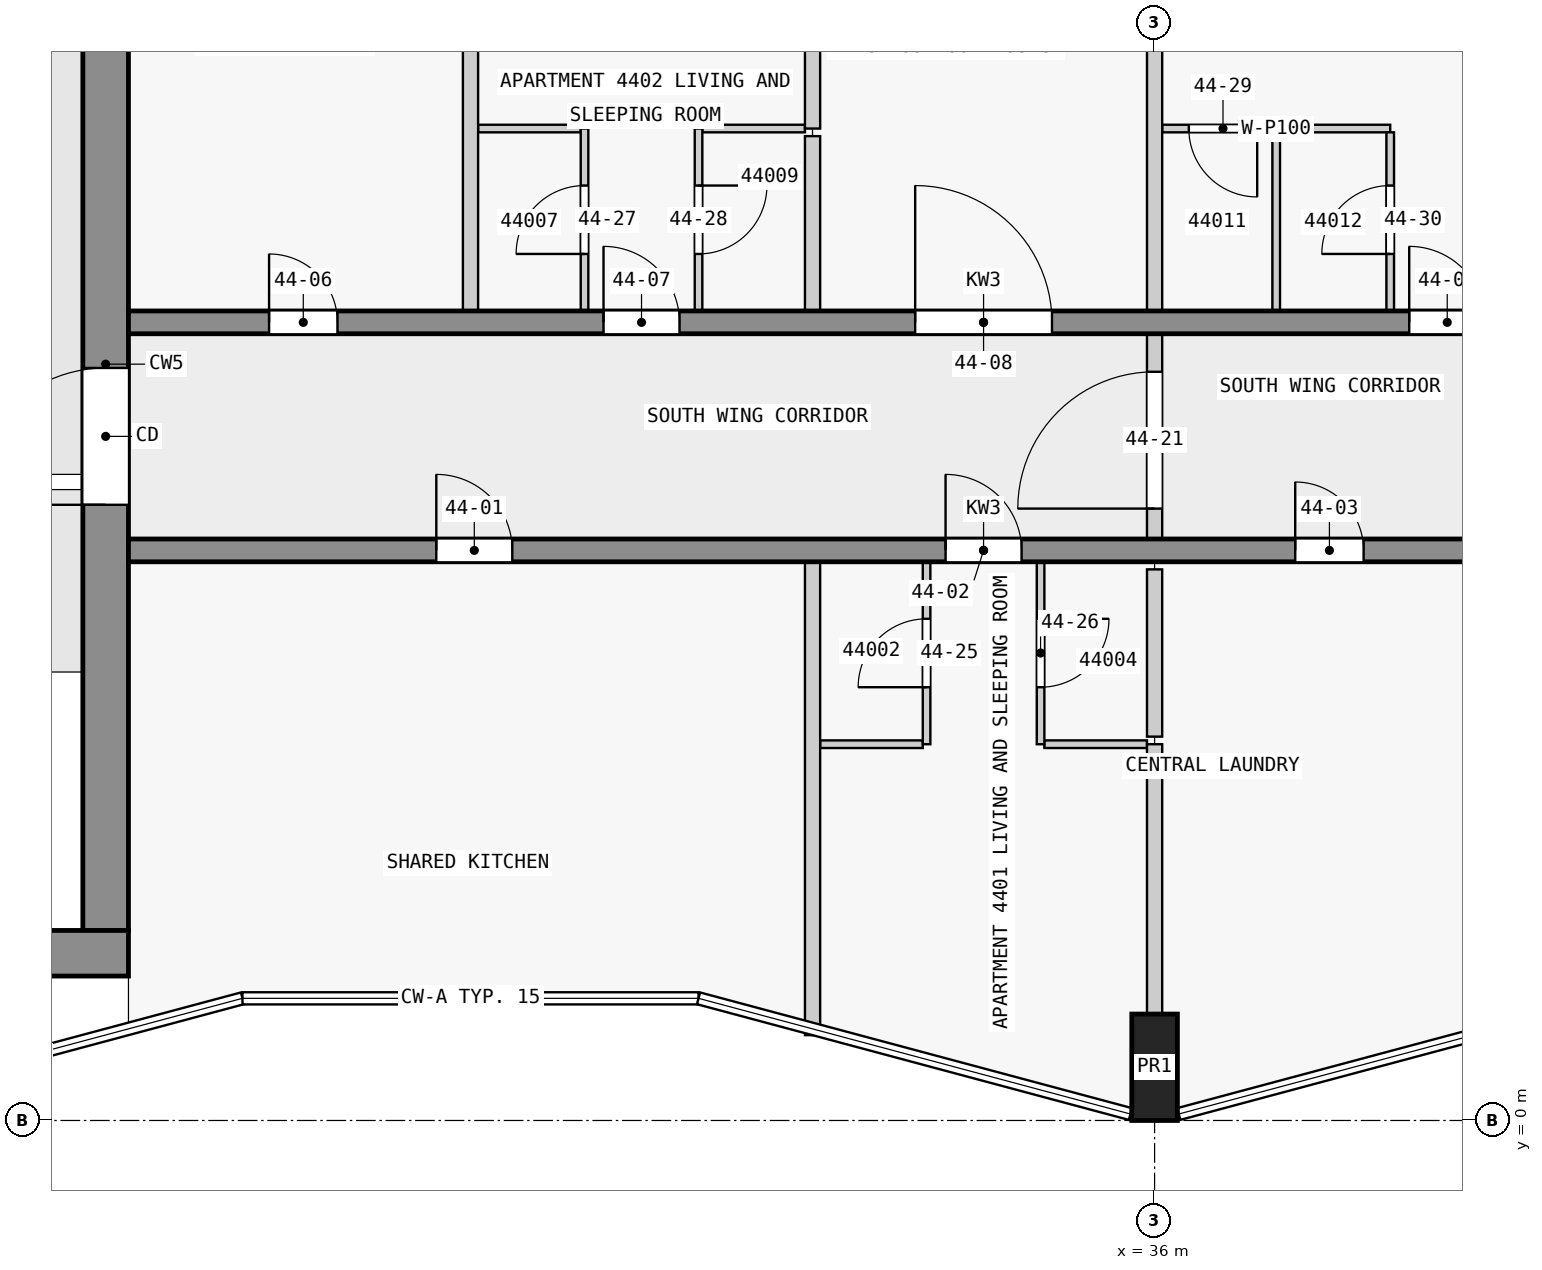
"""IFC4 building model, lengths in metres.
Left out: names, types, materials, properties, quantities, classifications, styles, units other than length and angle.
Written with IfcOpenShell. Run it as: python <this file> out.ifc"""

import sys

from ifc_helpers import new_model, si_unit, direction, frame, frame_2d, origin, origin_2d, place, context, subcontext, project, spatial, rectangle, extrude, element, fill, save


model = new_model("IFC4")
c1 = context("Model", 3, precision=1e-05, world=origin(), true_north=direction((0.0, 1.0)))
c2 = subcontext(c1, "Body", "Model", "MODEL_VIEW")
j1 = project(units=[si_unit("LENGTHUNIT", "METRE"), si_unit("PLANEANGLEUNIT", "RADIAN")], contexts=[c1])
p1 = place(None, origin())
s1 = spatial("IfcSite", under=j1, at=p1, CompositionType="ELEMENT")
p2 = place(p1, origin())
s2 = spatial("IfcBuilding", under=s1, at=p2, CompositionType="ELEMENT")
p3 = place(p2, frame((0.0, 0.0, 170.9)))
s3 = spatial("IfcBuildingStorey", under=s2, at=p3, CompositionType="ELEMENT", Elevation=170.9)
p4 = place(p3, frame((36.0, 0.7, 0.0), z_axis=(0.0, 0.0, 1.0), x_axis=(1.0, 0.0, 0.0)))
e1 = element("IfcColumn", 1, at=p4, inside=s3, PredefinedType="COLUMN", context=c2, shape_type="SweptSolid", body=[
    extrude(rectangle(XDim=0.6, YDim=1.4, at=origin_2d()), origin(), (0.0, 0.0, 1.0), 3.5),
])
p5 = place(p3, frame((1.7, 2.2, 0.0), z_axis=(0.0, 0.0, 1.0), x_axis=(1.0, 0.0, 0.0)))
e2 = element("IfcWall", 2, at=p5, inside=s3, PredefinedType="SHEAR", context=c2, shape_type="SweptSolid", body=[
    extrude(rectangle(XDim=20.8, YDim=0.6, at=frame_2d((10.4, 0.0))), origin(), (0.0, 0.0, 1.0), 3.25),
])
p6 = place(p3, frame((22.2, 2.5, 0.0), z_axis=(0.0, 0.0, 1.0), x_axis=(0.0, 1.0, 0.0)))
e3 = element("IfcWall", 3, at=p6, inside=s3, PredefinedType="SHEAR", context=c2, shape_type="SweptSolid", body=[
    extrude(rectangle(XDim=14.9, YDim=0.6, at=frame_2d((7.45, 0.0))), origin(), (0.0, 0.0, 1.0), 3.25),
])
p7 = place(p6, frame((5.6, 0.0, 0.0)))
e4 = element("IfcOpeningElement", 4, at=p7, cuts=e3, PredefinedType="OPENING", context=c2, shape_type="SweptSolid", body=[
    extrude(rectangle(XDim=1.8, YDim=2.1, at=frame_2d((0.9, 1.05))), frame((0.0, 0.31, 0.0), z_axis=(0.0, -1.0, 0.0), x_axis=(1.0, 0.0, 0.0)), (0.0, 0.0, 1.0), 0.62),
])
p8 = place(p3, frame((22.5, 7.5, 0.0), z_axis=(0.0, 0.0, 1.0), x_axis=(1.0, 0.0, 0.0)))
e5 = element("IfcWall", 5, at=p8, inside=s3, PredefinedType="SHEAR", context=c2, shape_type="SweptSolid", body=[
    extrude(rectangle(XDim=22.5, YDim=0.3, at=frame_2d((11.25, 0.0))), origin(), (0.0, 0.0, 1.0), 3.25),
])
p9 = place(p8, frame((4.05, 0.0, 0.0)))
e6 = element("IfcOpeningElement", 6, at=p9, cuts=e5, PredefinedType="OPENING", context=c2, shape_type="SweptSolid", body=[
    extrude(rectangle(XDim=1.0, YDim=2.1, at=frame_2d((0.5, 1.05))), frame((0.0, 0.16, 0.0), z_axis=(0.0, -1.0, 0.0), x_axis=(1.0, 0.0, 0.0)), (0.0, 0.0, 1.0), 0.32),
])
p10 = place(p8, frame((10.75, 0.0, 0.0)))
e7 = element("IfcOpeningElement", 7, at=p10, cuts=e5, PredefinedType="OPENING", context=c2, shape_type="SweptSolid", body=[
    extrude(rectangle(XDim=1.0, YDim=2.1, at=frame_2d((0.5, 1.05))), frame((0.0, 0.16, 0.0), z_axis=(0.0, -1.0, 0.0), x_axis=(1.0, 0.0, 0.0)), (0.0, 0.0, 1.0), 0.32),
])
p11 = place(p8, frame((15.35, 0.0, 0.0)))
e8 = element("IfcOpeningElement", 8, at=p11, cuts=e5, PredefinedType="OPENING", context=c2, shape_type="SweptSolid", body=[
    extrude(rectangle(XDim=0.9, YDim=2.1, at=frame_2d((0.45, 1.05))), frame((0.0, 0.16, 0.0), z_axis=(0.0, -1.0, 0.0), x_axis=(1.0, 0.0, 0.0)), (0.0, 0.0, 1.0), 0.32),
])
p12 = place(p8, frame((18.75, 0.0, 0.0)))
e9 = element("IfcOpeningElement", 9, at=p12, cuts=e5, PredefinedType="OPENING", context=c2, shape_type="SweptSolid", body=[
    extrude(rectangle(XDim=0.9, YDim=2.1, at=frame_2d((0.45, 1.05))), frame((0.0, 0.16, 0.0), z_axis=(0.0, -1.0, 0.0), x_axis=(1.0, 0.0, 0.0)), (0.0, 0.0, 1.0), 0.32),
])
p13 = place(p8, frame((20.95, 0.0, 0.0)))
e10 = element("IfcOpeningElement", 10, at=p13, cuts=e5, PredefinedType="OPENING", context=c2, shape_type="SweptSolid", body=[
    extrude(rectangle(XDim=1.0, YDim=2.1, at=frame_2d((0.5, 1.05))), frame((0.0, 0.16, 0.0), z_axis=(0.0, -1.0, 0.0), x_axis=(1.0, 0.0, 0.0)), (0.0, 0.0, 1.0), 0.32),
])
p14 = place(p3, frame((22.5, 10.5, 0.0), z_axis=(0.0, 0.0, 1.0), x_axis=(1.0, 0.0, 0.0)))
e11 = element("IfcWall", 11, at=p14, inside=s3, PredefinedType="SHEAR", context=c2, shape_type="SweptSolid", body=[
    extrude(rectangle(XDim=22.5, YDim=0.3, at=frame_2d((11.25, 0.0))), origin(), (0.0, 0.0, 1.0), 3.25),
])
p15 = place(p14, frame((1.85, 0.0, 0.0)))
e12 = element("IfcOpeningElement", 12, at=p15, cuts=e11, PredefinedType="OPENING", context=c2, shape_type="SweptSolid", body=[
    extrude(rectangle(XDim=0.9, YDim=2.1, at=frame_2d((0.45, 1.05))), frame((0.0, 0.16, 0.0), z_axis=(0.0, -1.0, 0.0), x_axis=(1.0, 0.0, 0.0)), (0.0, 0.0, 1.0), 0.32),
])
p16 = place(p14, frame((6.25, 0.0, 0.0)))
e13 = element("IfcOpeningElement", 13, at=p16, cuts=e11, PredefinedType="OPENING", context=c2, shape_type="SweptSolid", body=[
    extrude(rectangle(XDim=1.0, YDim=2.1, at=frame_2d((0.5, 1.05))), frame((0.0, 0.16, 0.0), z_axis=(0.0, -1.0, 0.0), x_axis=(1.0, 0.0, 0.0)), (0.0, 0.0, 1.0), 0.32),
])
p17 = place(p14, frame((10.35, 0.0, 0.0)))
e14 = element("IfcOpeningElement", 14, at=p17, cuts=e11, PredefinedType="OPENING", context=c2, shape_type="SweptSolid", body=[
    extrude(rectangle(XDim=1.8, YDim=2.1, at=frame_2d((0.9, 1.05))), frame((0.0, 0.16, 0.0), z_axis=(0.0, -1.0, 0.0), x_axis=(1.0, 0.0, 0.0)), (0.0, 0.0, 1.0), 0.32),
])
p18 = place(p14, frame((16.85, 0.0, 0.0)))
e15 = element("IfcOpeningElement", 15, at=p18, cuts=e11, PredefinedType="OPENING", context=c2, shape_type="SweptSolid", body=[
    extrude(rectangle(XDim=1.0, YDim=2.1, at=frame_2d((0.5, 1.05))), frame((0.0, 0.16, 0.0), z_axis=(0.0, -1.0, 0.0), x_axis=(1.0, 0.0, 0.0)), (0.0, 0.0, 1.0), 0.32),
])
for number, where, z_axis, x_axis in (
    (16, (31.6, 4.95, 0.0), (0.0, 0.0, 1.0), (1.0, 0.0, 0.0)),
    (17, (34.55, 4.95, 0.0), (0.0, 0.0, 1.0), (1.0, 0.0, 0.0)),
    (18, (28.45, 13.05, 0.0), (0.0, 0.0, 1.0), (-1.0, 0.0, 0.0)),
    (19, (31.4, 13.05, 0.0), (0.0, 0.0, 1.0), (-1.0, 0.0, 0.0)),
):
    element("IfcWall", number, at=place(p3, frame(where, z_axis=z_axis, x_axis=x_axis)), inside=s3, PredefinedType="PARTITIONING", context=c2, shape_type="SweptSolid", body=[
        extrude(rectangle(XDim=1.35, YDim=0.1, at=frame_2d((0.675, 0.0))), origin(), (0.0, 0.0, 1.0), 3.25),
    ])
p19 = place(p3, frame((39.1, 13.05, 0.0), z_axis=(0.0, 0.0, 1.0), x_axis=(-1.0, 0.0, 0.0)))
e20 = element("IfcWall", 20, at=p19, inside=s3, PredefinedType="PARTITIONING", context=c2, shape_type="SweptSolid", body=[
    extrude(rectangle(XDim=3.0, YDim=0.1, at=frame_2d((1.5, 0.0))), origin(), (0.0, 0.0, 1.0), 3.25),
])
p20 = place(p19, frame((1.75, 0.0, 0.0)))
e21 = element("IfcOpeningElement", 21, at=p20, cuts=e20, PredefinedType="OPENING", context=c2, shape_type="SweptSolid", body=[
    extrude(rectangle(XDim=0.9, YDim=2.1, at=frame_2d((0.45, 1.05))), frame((0.0, 0.06, 0.0), z_axis=(0.0, -1.0, 0.0), x_axis=(1.0, 0.0, 0.0)), (0.0, 0.0, 1.0), 0.12),
])
p21 = place(p3, frame((27.0, 10.65, 0.0), z_axis=(0.0, 0.0, 1.0), x_axis=(0.0, 1.0, 0.0)))
e22 = element("IfcWall", 22, at=p21, inside=s3, PredefinedType="PARTITIONING", context=c2, shape_type="SweptSolid", body=[
    extrude(rectangle(XDim=5.823, YDim=0.2, at=frame_2d((2.912, 0.0))), origin(), (0.0, 0.0, 1.0), 3.25),
])
p22 = place(p3, frame((28.5, 10.65, 0.0), z_axis=(0.0, 0.0, 1.0), x_axis=(0.0, 1.0, 0.0)))
e23 = element("IfcWall", 23, at=p22, inside=s3, PredefinedType="PARTITIONING", context=c2, shape_type="SweptSolid", body=[
    extrude(rectangle(XDim=2.4, YDim=0.1, at=frame_2d((1.2, 0.0))), origin(), (0.0, 0.0, 1.0), 3.25),
])
p23 = place(p22, frame((0.75, 0.0, 0.0)))
e24 = element("IfcOpeningElement", 24, at=p23, cuts=e23, PredefinedType="OPENING", context=c2, shape_type="SweptSolid", body=[
    extrude(rectangle(XDim=0.9, YDim=2.1, at=frame_2d((0.45, 1.05))), frame((0.0, 0.06, 0.0), z_axis=(0.0, -1.0, 0.0), x_axis=(1.0, 0.0, 0.0)), (0.0, 0.0, 1.0), 0.12),
])
p24 = place(p3, frame((30.0, 13.05, 0.0), z_axis=(0.0, 0.0, 1.0), x_axis=(0.0, -1.0, 0.0)))
e25 = element("IfcWall", 25, at=p24, inside=s3, PredefinedType="PARTITIONING", context=c2, shape_type="SweptSolid", body=[
    extrude(rectangle(XDim=2.4, YDim=0.1, at=frame_2d((1.2, 0.0))), origin(), (0.0, 0.0, 1.0), 3.25),
])
p25 = place(p24, frame((0.75, 0.0, 0.0)))
e26 = element("IfcOpeningElement", 26, at=p25, cuts=e25, PredefinedType="OPENING", context=c2, shape_type="SweptSolid", body=[
    extrude(rectangle(XDim=0.9, YDim=2.1, at=frame_2d((0.45, 1.05))), frame((0.0, 0.06, 0.0), z_axis=(0.0, -1.0, 0.0), x_axis=(1.0, 0.0, 0.0)), (0.0, 0.0, 1.0), 0.12),
])
p26 = place(p3, frame((31.5, 16.878, 0.0), z_axis=(0.0, 0.0, 1.0), x_axis=(0.0, -1.0, 0.0)))
e27 = element("IfcWall", 27, at=p26, inside=s3, PredefinedType="PARTITIONING", context=c2, shape_type="SweptSolid", body=[
    extrude(rectangle(XDim=3.828, YDim=0.2, at=frame_2d((1.914, 0.0))), origin(), (0.0, 0.0, 1.0), 3.25),
])
p27 = place(p3, frame((31.5, 1.122, 0.0), z_axis=(0.0, 0.0, 1.0), x_axis=(0.0, 1.0, 0.0)))
e28 = element("IfcWall", 28, at=p27, inside=s3, PredefinedType="PARTITIONING", context=c2, shape_type="SweptSolid", body=[
    extrude(rectangle(XDim=6.228, YDim=0.2, at=frame_2d((3.114, 0.0))), origin(), (0.0, 0.0, 1.0), 3.25),
])
p28 = place(p3, frame((31.5, 10.65, 0.0), z_axis=(0.0, 0.0, 1.0), x_axis=(0.0, 1.0, 0.0)))
e29 = element("IfcWall", 29, at=p28, inside=s3, PredefinedType="PARTITIONING", context=c2, shape_type="SweptSolid", body=[
    extrude(rectangle(XDim=2.3, YDim=0.2, at=frame_2d((1.15, 0.0))), origin(), (0.0, 0.0, 1.0), 3.25),
])
p29 = place(p3, frame((33.0, 4.95, 0.0), z_axis=(0.0, 0.0, 1.0), x_axis=(0.0, 1.0, 0.0)))
e30 = element("IfcWall", 30, at=p29, inside=s3, PredefinedType="PARTITIONING", context=c2, shape_type="SweptSolid", body=[
    extrude(rectangle(XDim=2.4, YDim=0.1, at=frame_2d((1.2, 0.0))), origin(), (0.0, 0.0, 1.0), 3.25),
])
p30 = place(p29, frame((0.75, 0.0, 0.0)))
e31 = element("IfcOpeningElement", 31, at=p30, cuts=e30, PredefinedType="OPENING", context=c2, shape_type="SweptSolid", body=[
    extrude(rectangle(XDim=0.9, YDim=2.1, at=frame_2d((0.45, 1.05))), frame((0.0, 0.06, 0.0), z_axis=(0.0, -1.0, 0.0), x_axis=(1.0, 0.0, 0.0)), (0.0, 0.0, 1.0), 0.12),
])
p31 = place(p3, frame((34.5, 7.35, 0.0), z_axis=(0.0, 0.0, 1.0), x_axis=(0.0, -1.0, 0.0)))
e32 = element("IfcWall", 32, at=p31, inside=s3, PredefinedType="PARTITIONING", context=c2, shape_type="SweptSolid", body=[
    extrude(rectangle(XDim=2.4, YDim=0.1, at=frame_2d((1.2, 0.0))), origin(), (0.0, 0.0, 1.0), 3.25),
])
p32 = place(p31, frame((0.75, 0.0, 0.0)))
e33 = element("IfcOpeningElement", 33, at=p32, cuts=e32, PredefinedType="OPENING", context=c2, shape_type="SweptSolid", body=[
    extrude(rectangle(XDim=0.9, YDim=2.1, at=frame_2d((0.45, 1.05))), frame((0.0, 0.06, 0.0), z_axis=(0.0, -1.0, 0.0), x_axis=(1.0, 0.0, 0.0)), (0.0, 0.0, 1.0), 0.12),
])
p33 = place(p3, frame((36.0, 4.95, 0.0), z_axis=(0.0, 0.0, 1.0), x_axis=(0.0, -1.0, 0.0)))
e34 = element("IfcWall", 34, at=p33, inside=s3, PredefinedType="PARTITIONING", context=c2, shape_type="SweptSolid", body=[
    extrude(rectangle(XDim=3.55, YDim=0.2, at=frame_2d((1.775, 0.0))), origin(), (0.0, 0.0, 1.0), 3.25),
])
p34 = place(p3, frame((36.0, 5.05, 0.0), z_axis=(0.0, 0.0, 1.0), x_axis=(0.0, 1.0, 0.0)))
e35 = element("IfcWall", 35, at=p34, inside=s3, PredefinedType="PARTITIONING", context=c2, shape_type="SweptSolid", body=[
    extrude(rectangle(XDim=2.2, YDim=0.2, at=frame_2d((1.1, 0.0))), origin(), (0.0, 0.0, 1.0), 3.25),
])
p35 = place(p3, frame((36.0, 10.65, 0.0), z_axis=(0.0, 0.0, 1.0), x_axis=(0.0, 1.0, 0.0)))
e36 = element("IfcWall", 36, at=p35, inside=s3, PredefinedType="PARTITIONING", context=c2, shape_type="SweptSolid", body=[
    extrude(rectangle(XDim=5.95, YDim=0.2, at=frame_2d((2.975, 0.0))), origin(), (0.0, 0.0, 1.0), 3.25),
])
p36 = place(p3, frame((37.6, 10.65, 0.0), z_axis=(0.0, 0.0, 1.0), x_axis=(0.0, 1.0, 0.0)))
e37 = element("IfcWall", 37, at=p36, inside=s3, PredefinedType="PARTITIONING", context=c2, shape_type="SweptSolid", body=[
    extrude(rectangle(XDim=2.35, YDim=0.1, at=frame_2d((1.175, 0.0))), origin(), (0.0, 0.0, 1.0), 3.25),
])
p37 = place(p3, frame((39.1, 10.65, 0.0), z_axis=(0.0, 0.0, 1.0), x_axis=(0.0, 1.0, 0.0)))
e38 = element("IfcWall", 38, at=p37, inside=s3, PredefinedType="PARTITIONING", context=c2, shape_type="SweptSolid", body=[
    extrude(rectangle(XDim=2.35, YDim=0.1, at=frame_2d((1.175, 0.0))), origin(), (0.0, 0.0, 1.0), 3.25),
])
p38 = place(p37, frame((0.75, 0.0, 0.0)))
e39 = element("IfcOpeningElement", 39, at=p38, cuts=e38, PredefinedType="OPENING", context=c2, shape_type="SweptSolid", body=[
    extrude(rectangle(XDim=0.9, YDim=2.1, at=frame_2d((0.45, 1.05))), frame((0.0, 0.06, 0.0), z_axis=(0.0, -1.0, 0.0), x_axis=(1.0, 0.0, 0.0)), (0.0, 0.0, 1.0), 0.12),
])
p39 = place(p3, frame((36.0, 7.35, 0.0), z_axis=(0.0, 0.0, 1.0), x_axis=(0.0, 1.0, 0.0)))
e40 = element("IfcWall", 40, at=p39, inside=s3, PredefinedType="PARTITIONING", context=c2, shape_type="SweptSolid", body=[
    extrude(rectangle(XDim=3.2, YDim=0.2, at=frame_2d((1.6, 0.0))), origin(), (0.0, 0.0, 1.0), 3.25),
])
p40 = place(p39, frame((0.7, 0.0, 0.0)))
e41 = element("IfcOpeningElement", 41, at=p40, cuts=e40, PredefinedType="OPENING", context=c2, shape_type="SweptSolid", body=[
    extrude(rectangle(XDim=1.8, YDim=2.1, at=frame_2d((0.9, 1.05))), frame((0.0, 0.11, 0.0), z_axis=(0.0, -1.0, 0.0), x_axis=(1.0, 0.0, 0.0)), (0.0, 0.0, 1.0), 0.22),
])
p41 = place(p7, origin())
e42 = element("IfcDoor", 42, at=p41, inside=s3, OperationType="DOUBLE_DOOR_SINGLE_SWING", PredefinedType="DOOR", context=c2, shape_type="SweptSolid", body=[
    extrude(rectangle(XDim=1.8, YDim=2.1, at=frame_2d((0.9, 1.05))), frame((0.0, 0.025, 0.0), z_axis=(0.0, -1.0, 0.0), x_axis=(1.0, 0.0, 0.0)), (0.0, 0.0, 1.0), 0.05),
])
fill(e4, e42)
p42 = place(p9, origin())
e43 = element("IfcDoor", 43, at=p42, inside=s3, OperationType="SINGLE_SWING_LEFT", PredefinedType="DOOR", context=c2, shape_type="SweptSolid", body=[
    extrude(rectangle(XDim=1.0, YDim=2.1, at=frame_2d((0.5, 1.05))), frame((0.0, 0.025, 0.0), z_axis=(0.0, -1.0, 0.0), x_axis=(1.0, 0.0, 0.0)), (0.0, 0.0, 1.0), 0.05),
])
fill(e6, e43)
p43 = place(p10, origin())
e44 = element("IfcDoor", 44, at=p43, inside=s3, OperationType="SINGLE_SWING_LEFT", PredefinedType="DOOR", context=c2, shape_type="SweptSolid", body=[
    extrude(rectangle(XDim=1.0, YDim=2.1, at=frame_2d((0.5, 1.05))), frame((0.0, 0.025, 0.0), z_axis=(0.0, -1.0, 0.0), x_axis=(1.0, 0.0, 0.0)), (0.0, 0.0, 1.0), 0.05),
])
fill(e7, e44)
p44 = place(p11, origin())
e45 = element("IfcDoor", 45, at=p44, inside=s3, OperationType="SINGLE_SWING_RIGHT", PredefinedType="DOOR", context=c2, shape_type="SweptSolid", body=[
    extrude(rectangle(XDim=0.9, YDim=2.1, at=frame_2d((0.45, 1.05))), frame((0.0, 0.025, 0.0), z_axis=(0.0, -1.0, 0.0), x_axis=(1.0, 0.0, 0.0)), (0.0, 0.0, 1.0), 0.05),
])
fill(e8, e45)
p45 = place(p15, origin())
e46 = element("IfcDoor", 46, at=p45, inside=s3, OperationType="SINGLE_SWING_LEFT", PredefinedType="DOOR", context=c2, shape_type="SweptSolid", body=[
    extrude(rectangle(XDim=0.9, YDim=2.1, at=frame_2d((0.45, 1.05))), frame((0.0, 0.025, 0.0), z_axis=(0.0, -1.0, 0.0), x_axis=(1.0, 0.0, 0.0)), (0.0, 0.0, 1.0), 0.05),
])
fill(e12, e46)
p46 = place(p16, origin())
e47 = element("IfcDoor", 47, at=p46, inside=s3, OperationType="SINGLE_SWING_LEFT", PredefinedType="DOOR", context=c2, shape_type="SweptSolid", body=[
    extrude(rectangle(XDim=1.0, YDim=2.1, at=frame_2d((0.5, 1.05))), frame((0.0, 0.025, 0.0), z_axis=(0.0, -1.0, 0.0), x_axis=(1.0, 0.0, 0.0)), (0.0, 0.0, 1.0), 0.05),
])
fill(e13, e47)
p47 = place(p17, origin())
e48 = element("IfcDoor", 48, at=p47, inside=s3, OperationType="SINGLE_SWING_LEFT", PredefinedType="DOOR", context=c2, shape_type="SweptSolid", body=[
    extrude(rectangle(XDim=1.8, YDim=2.1, at=frame_2d((0.9, 1.05))), frame((0.0, 0.025, 0.0), z_axis=(0.0, -1.0, 0.0), x_axis=(1.0, 0.0, 0.0)), (0.0, 0.0, 1.0), 0.05),
])
fill(e14, e48)
p48 = place(p18, origin())
e49 = element("IfcDoor", 49, at=p48, inside=s3, OperationType="SINGLE_SWING_RIGHT", PredefinedType="DOOR", context=c2, shape_type="SweptSolid", body=[
    extrude(rectangle(XDim=1.0, YDim=2.1, at=frame_2d((0.5, 1.05))), frame((0.0, 0.025, 0.0), z_axis=(0.0, -1.0, 0.0), x_axis=(1.0, 0.0, 0.0)), (0.0, 0.0, 1.0), 0.05),
])
fill(e15, e49)
p49 = place(p40, origin())
e50 = element("IfcDoor", 50, at=p49, inside=s3, OperationType="SINGLE_SWING_LEFT", PredefinedType="DOOR", context=c2, shape_type="SweptSolid", body=[
    extrude(rectangle(XDim=1.8, YDim=2.1, at=frame_2d((0.9, 1.05))), frame((0.0, 0.025, 0.0), z_axis=(0.0, -1.0, 0.0), x_axis=(1.0, 0.0, 0.0)), (0.0, 0.0, 1.0), 0.05),
])
fill(e41, e50)
p50 = place(p30, origin())
e51 = element("IfcDoor", 51, at=p50, inside=s3, OperationType="SINGLE_SWING_RIGHT", PredefinedType="DOOR", context=c2, shape_type="SweptSolid", body=[
    extrude(rectangle(XDim=0.9, YDim=2.1, at=frame_2d((0.45, 1.05))), frame((0.0, 0.025, 0.0), z_axis=(0.0, -1.0, 0.0), x_axis=(1.0, 0.0, 0.0)), (0.0, 0.0, 1.0), 0.05),
])
fill(e31, e51)
p51 = place(p32, origin())
e52 = element("IfcDoor", 52, at=p51, inside=s3, OperationType="SINGLE_SWING_RIGHT", PredefinedType="DOOR", context=c2, shape_type="SweptSolid", body=[
    extrude(rectangle(XDim=0.9, YDim=2.1, at=frame_2d((0.45, 1.05))), frame((0.0, 0.025, 0.0), z_axis=(0.0, -1.0, 0.0), x_axis=(1.0, 0.0, 0.0)), (0.0, 0.0, 1.0), 0.05),
])
fill(e33, e52)
p52 = place(p23, origin())
e53 = element("IfcDoor", 53, at=p52, inside=s3, OperationType="SINGLE_SWING_LEFT", PredefinedType="DOOR", context=c2, shape_type="SweptSolid", body=[
    extrude(rectangle(XDim=0.9, YDim=2.1, at=frame_2d((0.45, 1.05))), frame((0.0, 0.025, 0.0), z_axis=(0.0, -1.0, 0.0), x_axis=(1.0, 0.0, 0.0)), (0.0, 0.0, 1.0), 0.05),
])
fill(e24, e53)
p53 = place(p25, origin())
e54 = element("IfcDoor", 54, at=p53, inside=s3, OperationType="SINGLE_SWING_LEFT", PredefinedType="DOOR", context=c2, shape_type="SweptSolid", body=[
    extrude(rectangle(XDim=0.9, YDim=2.1, at=frame_2d((0.45, 1.05))), frame((0.0, 0.025, 0.0), z_axis=(0.0, -1.0, 0.0), x_axis=(1.0, 0.0, 0.0)), (0.0, 0.0, 1.0), 0.05),
])
fill(e26, e54)
p54 = place(p20, origin())
e55 = element("IfcDoor", 55, at=p54, inside=s3, OperationType="SINGLE_SWING_RIGHT", PredefinedType="DOOR", context=c2, shape_type="SweptSolid", body=[
    extrude(rectangle(XDim=0.9, YDim=2.1, at=frame_2d((0.45, 1.05))), frame((0.0, 0.025, 0.0), z_axis=(0.0, -1.0, 0.0), x_axis=(1.0, 0.0, 0.0)), (0.0, 0.0, 1.0), 0.05),
])
fill(e21, e55)
p55 = place(p38, origin())
e56 = element("IfcDoor", 56, at=p55, inside=s3, OperationType="SINGLE_SWING_RIGHT", PredefinedType="DOOR", context=c2, shape_type="SweptSolid", body=[
    extrude(rectangle(XDim=0.9, YDim=2.1, at=frame_2d((0.45, 1.05))), frame((0.0, 0.025, 0.0), z_axis=(0.0, -1.0, 0.0), x_axis=(1.0, 0.0, 0.0)), (0.0, 0.0, 1.0), 0.05),
])
fill(e39, e56)
save(model, sys.argv[1])
